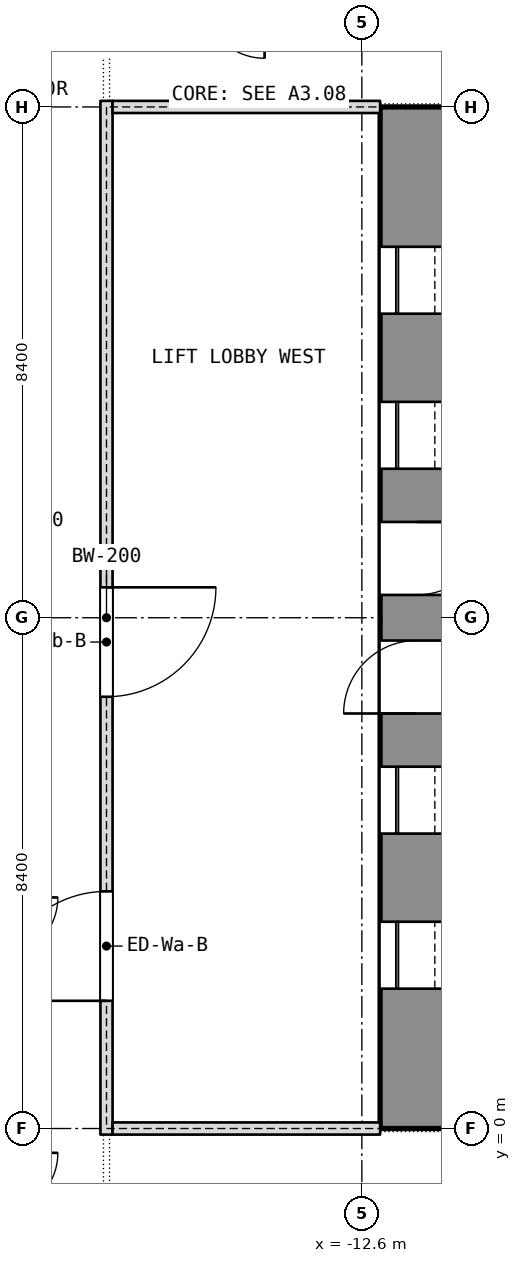
"""IFC4 building model, lengths in metres.
Left out: names, types, materials, properties, quantities, classifications, styles, units other than length and angle.
Written with IfcOpenShell. Run it as: python <this file> out.ifc"""

import sys

from ifc_helpers import new_model, si_unit, direction, frame, frame_2d, origin, place, context, subcontext, project, spatial, rectangle, extrude, element, fill, save


model = new_model("IFC4")
c1 = context("Model", 3, precision=1e-05, world=origin(), true_north=direction((0.0, 1.0)))
c2 = subcontext(c1, "Body", "Model", "MODEL_VIEW")
j1 = project(units=[si_unit("LENGTHUNIT", "METRE"), si_unit("PLANEANGLEUNIT", "RADIAN")], contexts=[c1])
p1 = place(None, origin())
s1 = spatial("IfcSite", under=j1, at=p1, CompositionType="ELEMENT")
p2 = place(p1, origin())
s2 = spatial("IfcBuilding", under=s1, at=p2, CompositionType="ELEMENT")
p3 = place(p2, frame((0.0, 0.0, 40.1)))
s3 = spatial("IfcBuildingStorey", under=s2, at=p3, CompositionType="ELEMENT", Elevation=40.1)
p4 = place(p3, frame((-11.7, 0.0, 0.0), z_axis=(0.0, 0.0, 1.0), x_axis=(0.0, 1.0, 0.0)))
e1 = element("IfcWall", 1, at=p4, inside=s3, PredefinedType="SHEAR", context=c2, shape_type="SweptSolid", body=[
    extrude(rectangle(XDim=16.8, YDim=1.2, at=frame_2d((8.4, 0.0))), origin(), (0.0, 0.0, 1.0), 3.6),
])
p5 = place(p4, frame((2.3, 0.0, 0.0)))
e2 = element("IfcOpeningElement", 2, at=p5, cuts=e1, PredefinedType="OPENING", context=c2, shape_type="SweptSolid", body=[
    extrude(rectangle(XDim=1.1, YDim=2.1, at=frame_2d((0.55, 1.05))), frame((0.0, 0.6, 0.0), z_axis=(0.0, -1.0, 0.0), x_axis=(1.0, 0.0, 0.0)), (0.0, 0.0, 1.0), 1.2),
])
p6 = place(p4, frame((4.85, 0.0, 0.0)))
e3 = element("IfcOpeningElement", 3, at=p6, cuts=e1, PredefinedType="OPENING", context=c2, shape_type="SweptSolid", body=[
    extrude(rectangle(XDim=1.1, YDim=2.1, at=frame_2d((0.55, 1.05))), frame((0.0, 0.6, 0.0), z_axis=(0.0, -1.0, 0.0), x_axis=(1.0, 0.0, 0.0)), (0.0, 0.0, 1.0), 1.2),
])
p7 = place(p4, frame((6.825, 0.0, 0.0)))
e4 = element("IfcOpeningElement", 4, at=p7, cuts=e1, PredefinedType="OPENING", context=c2, shape_type="SweptSolid", body=[
    extrude(rectangle(XDim=1.2, YDim=2.1, at=frame_2d((0.6, 1.05))), frame((0.0, 0.6, 0.0), z_axis=(0.0, -1.0, 0.0), x_axis=(1.0, 0.0, 0.0)), (0.0, 0.0, 1.0), 1.2),
])
p8 = place(p4, frame((13.4, 0.0, 0.0)))
e5 = element("IfcOpeningElement", 5, at=p8, cuts=e1, PredefinedType="OPENING", context=c2, shape_type="SweptSolid", body=[
    extrude(rectangle(XDim=1.1, YDim=2.1, at=frame_2d((0.55, 1.05))), frame((0.0, 0.6, 0.0), z_axis=(0.0, -1.0, 0.0), x_axis=(1.0, 0.0, 0.0)), (0.0, 0.0, 1.0), 1.2),
])
p9 = place(p4, frame((10.85, 0.0, 0.0)))
e6 = element("IfcOpeningElement", 6, at=p9, cuts=e1, PredefinedType="OPENING", context=c2, shape_type="SweptSolid", body=[
    extrude(rectangle(XDim=1.1, YDim=2.1, at=frame_2d((0.55, 1.05))), frame((0.0, 0.6, 0.0), z_axis=(0.0, -1.0, 0.0), x_axis=(1.0, 0.0, 0.0)), (0.0, 0.0, 1.0), 1.2),
])
p10 = place(p4, frame((8.775, 0.0, 0.0)))
e7 = element("IfcOpeningElement", 7, at=p10, cuts=e1, PredefinedType="OPENING", context=c2, shape_type="SweptSolid", body=[
    extrude(rectangle(XDim=1.2, YDim=2.1, at=frame_2d((0.6, 1.05))), frame((0.0, 0.6, 0.0), z_axis=(0.0, -1.0, 0.0), x_axis=(1.0, 0.0, 0.0)), (0.0, 0.0, 1.0), 1.2),
])
p11 = place(p3, frame((-16.8, -0.1, 0.0), z_axis=(0.0, 0.0, 1.0), x_axis=(0.0, 1.0, 0.0)))
e8 = element("IfcWall", 8, at=p11, inside=s3, PredefinedType="PARTITIONING", context=c2, shape_type="SweptSolid", body=[
    extrude(rectangle(XDim=17.0, YDim=0.2, at=frame_2d((8.5, 0.0))), origin(), (0.0, 0.0, 1.0), 3.34),
])
p12 = place(p11, frame((2.2, 0.0, 0.0)))
e9 = element("IfcOpeningElement", 9, at=p12, cuts=e8, PredefinedType="OPENING", context=c2, shape_type="SweptSolid", body=[
    extrude(rectangle(XDim=1.8, YDim=2.1, at=frame_2d((0.9, 1.05))), frame((0.0, 0.1, 0.0), z_axis=(0.0, -1.0, 0.0), x_axis=(1.0, 0.0, 0.0)), (0.0, 0.0, 1.0), 0.2),
])
p13 = place(p11, frame((7.2, 0.0, 0.0)))
e10 = element("IfcOpeningElement", 10, at=p13, cuts=e8, PredefinedType="OPENING", context=c2, shape_type="SweptSolid", body=[
    extrude(rectangle(XDim=1.8, YDim=2.1, at=frame_2d((0.9, 1.05))), frame((0.0, 0.1, 0.0), z_axis=(0.0, -1.0, 0.0), x_axis=(1.0, 0.0, 0.0)), (0.0, 0.0, 1.0), 0.2),
])
for number, where, z_axis, x_axis in (
    (11, (-16.7, 0.0, 0.0), (0.0, 0.0, 1.0), (1.0, 0.0, 0.0)),
    (12, (-16.7, 16.8, 0.0), (0.0, 0.0, 1.0), (1.0, 0.0, 0.0)),
):
    element("IfcWall", number, at=place(p3, frame(where, z_axis=z_axis, x_axis=x_axis)), inside=s3, PredefinedType="PARTITIONING", context=c2, shape_type="SweptSolid", body=[
        extrude(rectangle(XDim=4.4, YDim=0.2, at=frame_2d((2.2, 0.0))), origin(), (0.0, 0.0, 1.0), 2.84),
    ])
p14 = place(p5, origin())
e13 = element("IfcDoor", 13, at=p14, inside=s3, OperationType="SLIDING_TO_LEFT", PredefinedType="DOOR", context=c2, shape_type="SweptSolid", body=[
    extrude(rectangle(XDim=1.1, YDim=2.1, at=frame_2d((0.55, 1.05))), frame((0.0, 0.025, 0.0), z_axis=(0.0, -1.0, 0.0), x_axis=(1.0, 0.0, 0.0)), (0.0, 0.0, 1.0), 0.05),
])
fill(e2, e13)
p15 = place(p6, origin())
e14 = element("IfcDoor", 14, at=p15, inside=s3, OperationType="SLIDING_TO_LEFT", PredefinedType="DOOR", context=c2, shape_type="SweptSolid", body=[
    extrude(rectangle(XDim=1.1, YDim=2.1, at=frame_2d((0.55, 1.05))), frame((0.0, 0.025, 0.0), z_axis=(0.0, -1.0, 0.0), x_axis=(1.0, 0.0, 0.0)), (0.0, 0.0, 1.0), 0.05),
])
fill(e3, e14)
p16 = place(p7, origin())
e15 = element("IfcDoor", 15, at=p16, inside=s3, OperationType="SINGLE_SWING_LEFT", PredefinedType="DOOR", context=c2, shape_type="SweptSolid", body=[
    extrude(rectangle(XDim=1.2, YDim=2.1, at=frame_2d((0.6, 1.05))), frame((0.0, 0.025, 0.0), z_axis=(0.0, -1.0, 0.0), x_axis=(1.0, 0.0, 0.0)), (0.0, 0.0, 1.0), 0.05),
])
fill(e4, e15)
p17 = place(p8, origin())
e16 = element("IfcDoor", 16, at=p17, inside=s3, OperationType="SLIDING_TO_LEFT", PredefinedType="DOOR", context=c2, shape_type="SweptSolid", body=[
    extrude(rectangle(XDim=1.1, YDim=2.1, at=frame_2d((0.55, 1.05))), frame((0.0, 0.025, 0.0), z_axis=(0.0, -1.0, 0.0), x_axis=(1.0, 0.0, 0.0)), (0.0, 0.0, 1.0), 0.05),
])
fill(e5, e16)
p18 = place(p9, origin())
e17 = element("IfcDoor", 17, at=p18, inside=s3, OperationType="SLIDING_TO_LEFT", PredefinedType="DOOR", context=c2, shape_type="SweptSolid", body=[
    extrude(rectangle(XDim=1.1, YDim=2.1, at=frame_2d((0.55, 1.05))), frame((0.0, 0.025, 0.0), z_axis=(0.0, -1.0, 0.0), x_axis=(1.0, 0.0, 0.0)), (0.0, 0.0, 1.0), 0.05),
])
fill(e6, e17)
p19 = place(p10, origin())
e18 = element("IfcDoor", 18, at=p19, inside=s3, OperationType="SINGLE_SWING_LEFT", PredefinedType="DOOR", context=c2, shape_type="SweptSolid", body=[
    extrude(rectangle(XDim=1.2, YDim=2.1, at=frame_2d((0.6, 1.05))), frame((0.0, 0.025, 0.0), z_axis=(0.0, -1.0, 0.0), x_axis=(1.0, 0.0, 0.0)), (0.0, 0.0, 1.0), 0.05),
])
fill(e7, e18)
p20 = place(p12, origin())
e19 = element("IfcDoor", 19, at=p20, inside=s3, OperationType="DOUBLE_DOOR_SINGLE_SWING", PredefinedType="DOOR", context=c2, shape_type="SweptSolid", body=[
    extrude(rectangle(XDim=1.8, YDim=2.1, at=frame_2d((0.9, 1.05))), frame((0.0, 0.025, 0.0), z_axis=(0.0, -1.0, 0.0), x_axis=(1.0, 0.0, 0.0)), (0.0, 0.0, 1.0), 0.05),
])
fill(e9, e19)
p21 = place(p13, origin())
e20 = element("IfcDoor", 20, at=p21, inside=s3, OperationType="DOUBLE_DOOR_SINGLE_SWING", PredefinedType="DOOR", context=c2, shape_type="SweptSolid", body=[
    extrude(rectangle(XDim=1.8, YDim=2.1, at=frame_2d((0.9, 1.05))), frame((0.0, 0.025, 0.0), z_axis=(0.0, -1.0, 0.0), x_axis=(1.0, 0.0, 0.0)), (0.0, 0.0, 1.0), 0.05),
])
fill(e10, e20)
save(model, sys.argv[1])
